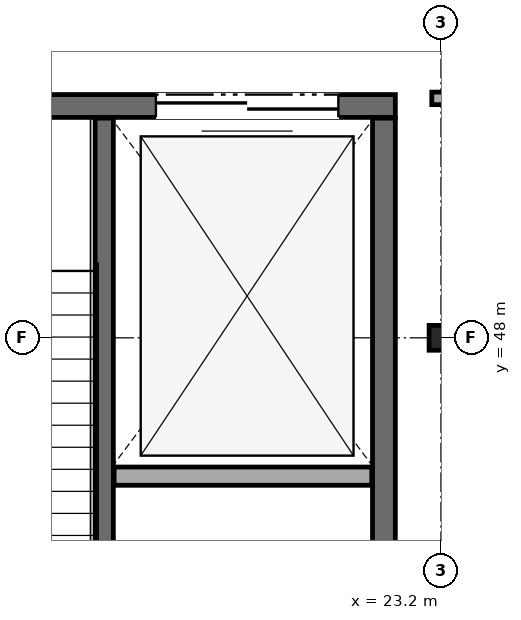
"""IFC4 building model, lengths in metres.
Left out: names, types, materials, properties, quantities, classifications, styles, units other than length and angle.
Written with IfcOpenShell. Run it as: python <this file> out.ifc"""

import sys

from ifc_helpers import new_model, si_unit, direction, frame, frame_2d, origin, origin_2d, place, context, subcontext, project, spatial, rectangle, i_section, extrude, element, fill, save


model = new_model("IFC4")
c1 = context("Model", 3, precision=1e-05, world=origin(), true_north=direction((0.0, 1.0)))
c2 = subcontext(c1, "Body", "Model", "MODEL_VIEW")
j1 = project(units=[si_unit("LENGTHUNIT", "METRE"), si_unit("PLANEANGLEUNIT", "RADIAN")], contexts=[c1])
p1 = place(None, origin())
s1 = spatial("IfcSite", under=j1, at=p1, CompositionType="ELEMENT")
p2 = place(p1, origin())
s2 = spatial("IfcBuilding", under=s1, at=p2, CompositionType="ELEMENT")
p3 = place(p2, frame((0.0, 0.0, 10.1)))
s3 = spatial("IfcBuildingStorey", under=s2, at=p3, CompositionType="ELEMENT", Elevation=10.1)
p4 = place(p3, frame((23.2, 48.0, 0.0), z_axis=(0.0, 0.0, 1.0), x_axis=(1.0, 0.0, 0.0)))
e1 = element("IfcColumn", 1, at=p4, inside=s3, PredefinedType="COLUMN", context=c2, shape_type="SweptSolid", body=[
    extrude(i_section(OverallWidth=0.311, OverallDepth=0.327, WebThickness=0.016, FlangeThickness=0.025, FilletRadius=0.017, at=origin_2d()), origin(), (0.0, 0.0, 1.0), 4.5),
])
p5 = place(p3, frame((22.6, 51.05, 0.0), z_axis=(0.0, 0.0, 1.0), x_axis=(-1.0, 0.0, 0.0)))
e2 = element("IfcWall", 2, at=p5, inside=s3, PredefinedType="SHEAR", context=c2, shape_type="SweptSolid", body=[
    extrude(rectangle(XDim=8.4, YDim=0.3, at=frame_2d((4.2, 0.0))), origin(), (0.0, 0.0, 1.0), 4.215),
])
p6 = place(p5, frame((5.435, 0.0, 0.0)))
e3 = element("IfcOpeningElement", 3, at=p6, cuts=e2, PredefinedType="OPENING", context=c2, shape_type="SweptSolid", body=[
    extrude(rectangle(XDim=1.25, YDim=2.2, at=frame_2d((0.625, 1.1))), frame((0.0, 0.16, 0.0), z_axis=(0.0, -1.0, 0.0), x_axis=(1.0, 0.0, 0.0)), (0.0, 0.0, 1.0), 0.32),
])
p7 = place(p5, frame((0.75, 0.0, 0.0)))
e4 = element("IfcOpeningElement", 4, at=p7, cuts=e2, PredefinedType="OPENING", context=c2, shape_type="SweptSolid", body=[
    extrude(rectangle(XDim=2.4, YDim=2.55, at=frame_2d((1.2, 1.275))), frame((0.0, 0.16, 0.0), z_axis=(0.0, -1.0, 0.0), x_axis=(1.0, 0.0, 0.0)), (0.0, 0.0, 1.0), 0.32),
])
p8 = place(p3, frame((22.45, 41.51, 0.0), z_axis=(0.0, 0.0, 1.0), x_axis=(0.0, 1.0, 0.0)))
e5 = element("IfcWall", 5, at=p8, inside=s3, PredefinedType="SHEAR", context=c2, shape_type="SweptSolid", body=[
    extrude(rectangle(XDim=9.38, YDim=0.3, at=frame_2d((4.69, 0.0))), origin(), (0.0, 0.0, 1.0), 4.215),
])
p9 = place(p3, frame((18.77, 41.51, 0.0), z_axis=(0.0, 0.0, 1.0), x_axis=(0.0, 1.0, 0.0)))
e6 = element("IfcWall", 6, at=p9, inside=s3, PredefinedType="SOLIDWALL", context=c2, shape_type="SweptSolid", body=[
    extrude(rectangle(XDim=9.38, YDim=0.24, at=frame_2d((4.69, 0.0))), origin(), (0.0, 0.0, 1.0), 4.215),
])
p10 = place(p3, frame((18.9, 46.18, 0.0), z_axis=(0.0, 0.0, 1.0), x_axis=(1.0, 0.0, 0.0)))
e7 = element("IfcWall", 7, at=p10, inside=s3, PredefinedType="SOLIDWALL", context=c2, shape_type="SweptSolid", body=[
    extrude(rectangle(XDim=3.39, YDim=0.24, at=frame_2d((1.695, 0.0))), origin(), (0.0, 0.0, 1.0), 4.215),
])
p11 = place(p3, frame((23.08, 51.15, 0.0), z_axis=(0.0, 0.0, 1.0), x_axis=(1.0, 0.0, 0.0)))
e8 = element("IfcWall", 8, at=p11, inside=s3, PredefinedType="PARTITIONING", context=c2, shape_type="SweptSolid", body=[
    extrude(rectangle(XDim=3.04, YDim=0.165, at=frame_2d((1.52, 0.0))), origin(), (0.0, 0.0, 1.0), 3.733),
])
p12 = place(p7, origin())
e9 = element("IfcDoor", 9, at=p12, inside=s3, OperationType="DOUBLE_DOOR_SLIDING", PredefinedType="DOOR", context=c2, shape_type="SweptSolid", body=[
    extrude(rectangle(XDim=2.4, YDim=2.55, at=frame_2d((1.2, 1.275))), frame((0.0, 0.025, 0.0), z_axis=(0.0, -1.0, 0.0), x_axis=(1.0, 0.0, 0.0)), (0.0, 0.0, 1.0), 0.05),
])
fill(e4, e9)
save(model, sys.argv[1])
